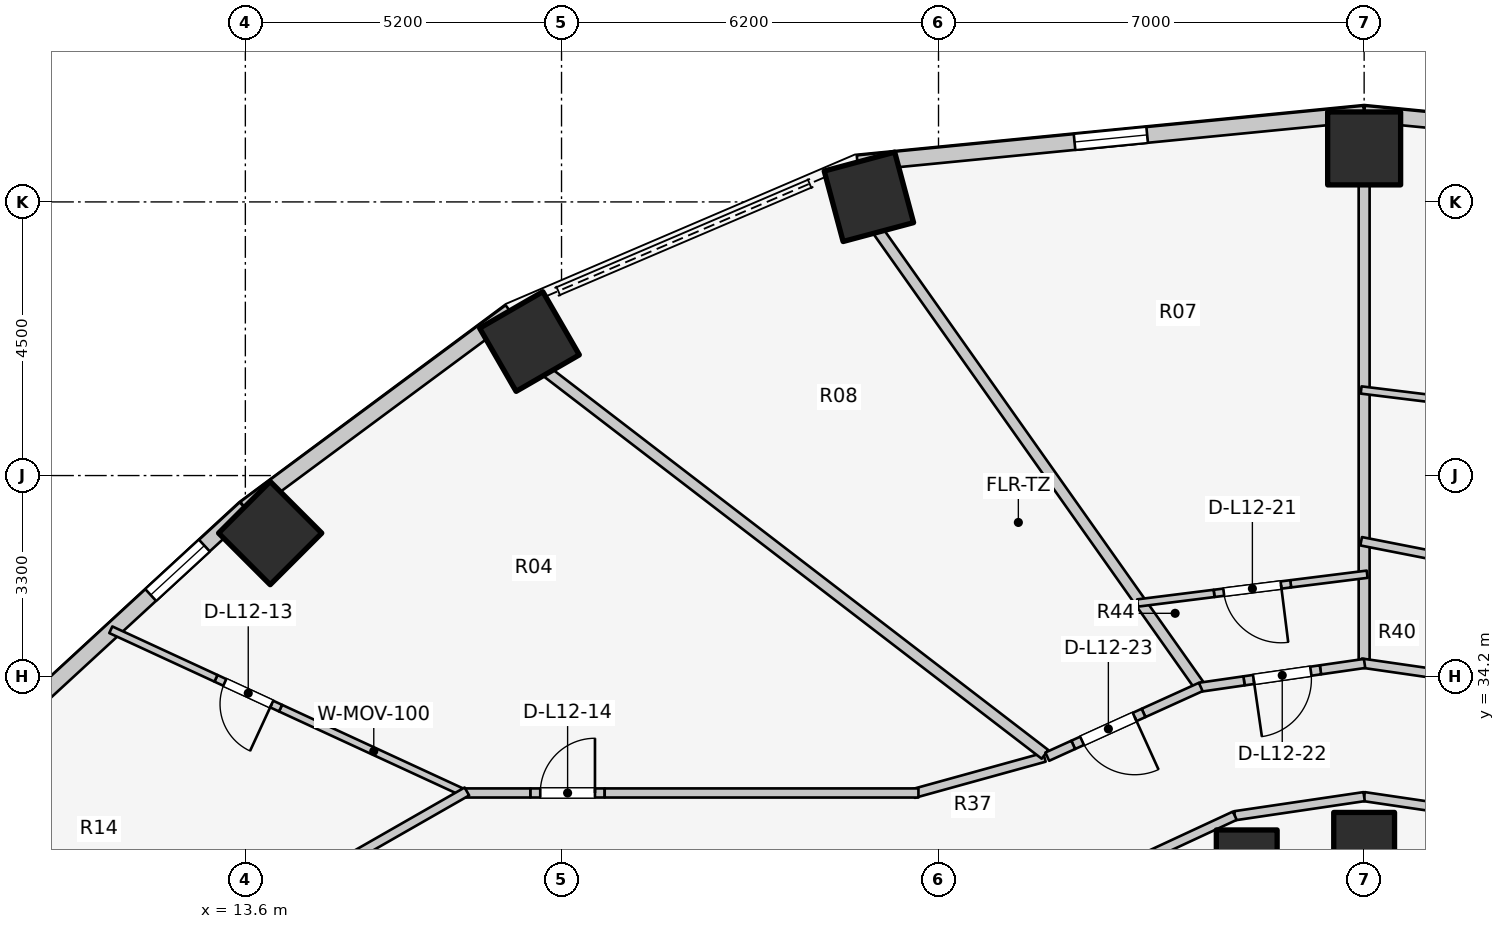
"""IFC4 building model, lengths in metres.
Left out: names, types, materials, properties, quantities, classifications, styles, units other than length and angle.
Written with IfcOpenShell. Run it as: python <this file> out.ifc"""

import sys

from ifc_helpers import new_model, si_unit, direction, frame, frame_2d, origin, origin_2d, place, context, subcontext, project, spatial, rectangle, extrude, element, fill, save


model = new_model("IFC4")
c1 = context("Model", 3, precision=1e-05, world=origin(), true_north=direction((0.0, 1.0)))
c2 = subcontext(c1, "Body", "Model", "MODEL_VIEW")
j1 = project(units=[si_unit("LENGTHUNIT", "METRE"), si_unit("PLANEANGLEUNIT", "RADIAN")], contexts=[c1])
p1 = place(None, origin())
s1 = spatial("IfcSite", under=j1, at=p1, CompositionType="ELEMENT")
p2 = place(p1, origin())
s2 = spatial("IfcBuilding", under=s1, at=p2, CompositionType="ELEMENT")
p3 = place(p2, frame((0.0, 0.0, 43.1)))
s3 = spatial("IfcBuildingStorey", under=s2, at=p3, CompositionType="ELEMENT", Elevation=43.1)
p4 = place(p3, frame((32.0, 31.46, 0.0), z_axis=(0.0, 0.0, 1.0), x_axis=(1.0, 0.0, 0.0)))
e1 = element("IfcColumn", 1, at=p4, inside=s3, PredefinedType="COLUMN", context=c2, shape_type="SweptSolid", body=[
    extrude(rectangle(XDim=1.0, YDim=1.0, at=origin_2d()), origin(), (0.0, 0.0, 1.0), 3.1),
])
p5 = place(p3, frame((32.0, 42.88, 0.0), z_axis=(0.0, 0.0, 1.0), x_axis=(0.0, 1.0, 0.0)))
e2 = element("IfcColumn", 2, at=p5, inside=s3, PredefinedType="COLUMN", context=c2, shape_type="SweptSolid", body=[
    extrude(rectangle(XDim=1.2, YDim=1.2, at=origin_2d()), origin(), (0.0, 0.0, 1.0), 3.1),
])
p6 = place(p3, frame((30.069, 31.172, 0.0), z_axis=(0.0, 0.0, 1.0), x_axis=(1.0, 0.0, 0.0)))
e3 = element("IfcColumn", 3, at=p6, inside=s3, PredefinedType="COLUMN", context=c2, shape_type="SweptSolid", body=[
    extrude(rectangle(XDim=1.0, YDim=1.0, at=origin_2d()), origin(), (0.0, 0.0, 1.0), 3.1),
])
for number, where, z_axis, x_axis in (
    (4, (23.855, 42.084, 0.0), (0.0, 0.0, 1.0), (-0.259, 0.966, 0.0)),
    (5, (18.273, 39.704, 0.0), (0.0, 0.0, 1.0), (-0.5, 0.866, 0.0)),
    (6, (14.008, 36.554, 0.0), (0.0, 0.0, 1.0), (-0.707, 0.707, 0.0)),
):
    element("IfcColumn", number, at=place(p3, frame(where, z_axis=z_axis, x_axis=x_axis)), inside=s3, PredefinedType="COLUMN", context=c2, shape_type="SweptSolid", body=[
        extrude(rectangle(XDim=1.2, YDim=1.2, at=origin_2d()), origin(), (0.0, 0.0, 1.0), 3.1),
    ])
p7 = place(p3, frame((40.332, 42.636, 0.0), z_axis=(0.0, 0.0, 1.0), x_axis=(-0.995247718352, 0.097375454379, 0.0)))
e7 = element("IfcWall", 7, at=p7, inside=s3, PredefinedType="STANDARD", context=c2, shape_type="SweptSolid", body=[
    extrude(rectangle(XDim=8.372, YDim=0.26, at=frame_2d((4.186, 0.0))), origin(), (0.0, 0.0, 1.0), 1.22),
])
p8 = place(p7, frame((3.586, 0.0, 0.15)))
e8 = element("IfcOpeningElement", 8, at=p8, cuts=e7, PredefinedType="OPENING", context=c2, shape_type="SweptSolid", body=[
    extrude(rectangle(XDim=1.2, YDim=0.9, at=frame_2d((0.6, 0.45))), frame((0.0, 0.14, 0.0), z_axis=(0.0, -1.0, 0.0), x_axis=(1.0, 0.0, 0.0)), (0.0, 0.0, 1.0), 0.28),
])
p9 = place(p3, frame((32.0, 43.451, 0.0), z_axis=(0.0, 0.0, 1.0), x_axis=(-0.995247718352, -0.097375454379, 0.0)))
e9 = element("IfcWall", 9, at=p9, inside=s3, PredefinedType="STANDARD", context=c2, shape_type="SweptSolid", body=[
    extrude(rectangle(XDim=8.372, YDim=0.26, at=frame_2d((4.186, 0.0))), origin(), (0.0, 0.0, 1.0), 1.22),
])
p10 = place(p9, frame((3.586, 0.0, 0.15)))
e10 = element("IfcOpeningElement", 10, at=p10, cuts=e9, PredefinedType="OPENING", context=c2, shape_type="SweptSolid", body=[
    extrude(rectangle(XDim=1.2, YDim=0.9, at=frame_2d((0.6, 0.45))), frame((0.0, 0.14, 0.0), z_axis=(0.0, -1.0, 0.0), x_axis=(1.0, 0.0, 0.0)), (0.0, 0.0, 1.0), 0.28),
])
p11 = place(p3, frame((17.958, 40.197, 0.0), z_axis=(0.0, 0.0, 1.0), x_axis=(-0.803477531792, -0.595335078679, 0.0)))
e11 = element("IfcWall", 11, at=p11, inside=s3, PredefinedType="STANDARD", context=c2, shape_type="SweptSolid", body=[
    extrude(rectangle(XDim=5.43, YDim=0.26, at=frame_2d((2.715, 0.0))), origin(), (0.0, 0.0, 1.0), 1.22),
])
p12 = place(p3, frame((13.595, 36.965, 0.0), z_axis=(0.0, 0.0, 1.0), x_axis=(-0.735655109293, -0.67735630223, 0.0)))
e12 = element("IfcWall", 12, at=p12, inside=s3, PredefinedType="STANDARD", context=c2, shape_type="SweptSolid", body=[
    extrude(rectangle(XDim=5.151, YDim=0.26, at=frame_2d((2.575, 0.0))), origin(), (0.0, 0.0, 1.0), 1.22),
])
p13 = place(p12, frame((0.91, 0.0, 0.15)))
e13 = element("IfcOpeningElement", 13, at=p13, cuts=e12, PredefinedType="OPENING", context=c2, shape_type="SweptSolid", body=[
    extrude(rectangle(XDim=1.2, YDim=0.9, at=frame_2d((0.6, 0.45))), frame((0.0, 0.14, 0.0), z_axis=(0.0, -1.0, 0.0), x_axis=(1.0, 0.0, 0.0)), (0.0, 0.0, 1.0), 0.28),
])
for number, where, z_axis, x_axis in (
    (14, (34.127, 31.906, 0.0), (0.0, 0.0, 1.0), (-0.989, 0.146, 0.0)),
    (15, (32.0, 32.22, 0.0), (0.0, 0.0, 1.0), (-0.989, -0.146, 0.0)),
):
    element("IfcWall", number, at=place(p3, frame(where, z_axis=z_axis, x_axis=x_axis)), inside=s3, PredefinedType="PARTITIONING", context=c2, shape_type="SweptSolid", body=[
        extrude(rectangle(XDim=2.151, YDim=0.15, at=frame_2d((1.075, 0.0))), origin(), (0.0, 0.0, 1.0), 1.22),
    ])
p14 = place(p3, frame((29.873, 31.906, 0.0), z_axis=(0.0, 0.0, 1.0), x_axis=(-0.906943449489, -0.421252393975, 0.0)))
e16 = element("IfcWall", 16, at=p14, inside=s3, PredefinedType="PARTITIONING", context=c2, shape_type="SweptSolid", body=[
    extrude(rectangle(XDim=2.186, YDim=0.15, at=frame_2d((1.093, 0.0))), origin(), (0.0, 0.0, 1.0), 1.22),
])
p15 = place(p3, frame((17.245, 32.259, 0.0), z_axis=(0.0, 0.0, 1.0), x_axis=(-0.907887445426, 0.419214010307, 0.0)))
e17 = element("IfcWall", 17, at=p15, inside=s3, PredefinedType="MOVABLE", context=c2, shape_type="SweptSolid", body=[
    extrude(rectangle(XDim=3.378, YDim=0.12, at=frame_2d((1.689, 0.0))), origin(), (0.0, 0.0, 1.0), 1.22),
])
p16 = place(p3, frame((14.179, 33.675, 0.0), z_axis=(0.0, 0.0, 1.0), x_axis=(-0.907812768844, 0.419375698776, 0.0)))
e18 = element("IfcWall", 18, at=p16, inside=s3, PredefinedType="MOVABLE", context=c2, shape_type="SweptSolid", body=[
    extrude(rectangle(XDim=1.17, YDim=0.12, at=frame_2d((0.585, 0.0))), origin(), (0.0, 0.0, 1.0), 2.11),
])
p17 = place(p16, frame((0.16, 0.0, 0.0)))
e19 = element("IfcOpeningElement", 19, at=p17, cuts=e18, PredefinedType="OPENING", context=c2, shape_type="SweptSolid", body=[
    extrude(rectangle(XDim=0.85, YDim=2.05, at=frame_2d((0.425, 1.025))), frame((0.0, 0.07, 0.0), z_axis=(0.0, -1.0, 0.0), x_axis=(1.0, 0.0, 0.0)), (0.0, 0.0, 1.0), 0.14),
])
p18 = place(p3, frame((13.116, 34.166, 0.0), z_axis=(0.0, 0.0, 1.0), x_axis=(-0.907914359179, 0.419155718554, 0.0)))
e20 = element("IfcWall", 20, at=p18, inside=s3, PredefinedType="MOVABLE", context=c2, shape_type="SweptSolid", body=[
    extrude(rectangle(XDim=1.905, YDim=0.12, at=frame_2d((0.952, 0.0))), origin(), (0.0, 0.0, 1.0), 2.575),
])
p19 = place(p3, frame((26.742, 32.867, 0.0), z_axis=(0.0, 0.0, 1.0), x_axis=(-0.963833843713, -0.266503886865, 0.0)))
e21 = element("IfcWall", 21, at=p19, inside=s3, PredefinedType="PARTITIONING", context=c2, shape_type="SweptSolid", body=[
    extrude(rectangle(XDim=2.232, YDim=0.15, at=frame_2d((1.116, 0.0))), origin(), (0.0, 0.0, 1.0), 1.22),
])
p20 = place(p3, frame((17.15, 32.28, 0.0), z_axis=(0.0, 0.0, 1.0), x_axis=(1.0, 0.0, 0.0)))
e22 = element("IfcWall", 22, at=p20, inside=s3, PredefinedType="PARTITIONING", context=c2, shape_type="SweptSolid", body=[
    extrude(rectangle(XDim=1.14, YDim=0.15, at=frame_2d((0.57, 0.0))), origin(), (0.0, 0.0, 1.0), 2.575),
])
p21 = place(p3, frame((18.29, 32.28, 0.0), z_axis=(0.0, 0.0, 1.0), x_axis=(1.0, 0.0, 0.0)))
e23 = element("IfcWall", 23, at=p21, inside=s3, PredefinedType="PARTITIONING", context=c2, shape_type="SweptSolid", body=[
    extrude(rectangle(XDim=1.22, YDim=0.15, at=frame_2d((0.61, 0.0))), origin(), (0.0, 0.0, 1.0), 2.575),
])
p22 = place(p21, frame((0.16, 0.0, 0.0)))
e24 = element("IfcOpeningElement", 24, at=p22, cuts=e23, PredefinedType="OPENING", context=c2, shape_type="SweptSolid", body=[
    extrude(rectangle(XDim=0.9, YDim=2.1, at=frame_2d((0.45, 1.05))), frame((0.0, 0.085, 0.0), z_axis=(0.0, -1.0, 0.0), x_axis=(1.0, 0.0, 0.0)), (0.0, 0.0, 1.0), 0.17),
])
p23 = place(p3, frame((19.51, 32.28, 0.0), z_axis=(0.0, 0.0, 1.0), x_axis=(1.0, 0.0, 0.0)))
e25 = element("IfcWall", 25, at=p23, inside=s3, PredefinedType="PARTITIONING", context=c2, shape_type="SweptSolid", body=[
    extrude(rectangle(XDim=5.16, YDim=0.15, at=frame_2d((2.58, 0.0))), origin(), (0.0, 0.0, 1.0), 1.22),
])
p24 = place(p3, frame((17.243, 32.305, 0.0), z_axis=(0.0, 0.0, 1.0), x_axis=(-0.867991349648, -0.496579315857, 0.0)))
e26 = element("IfcWall", 26, at=p24, inside=s3, PredefinedType="PARTITIONING", context=c2, shape_type="SweptSolid", body=[
    extrude(rectangle(XDim=2.567, YDim=0.15, at=frame_2d((1.283, 0.0))), origin(), (0.0, 0.0, 1.0), 1.22),
])
p25 = place(p3, frame((32.0, 34.465, 0.0), z_axis=(0.0, 0.0, 1.0), x_axis=(0.0, 1.0, 0.0)))
e27 = element("IfcWall", 27, at=p25, inside=s3, PredefinedType="PARTITIONING", context=c2, shape_type="SweptSolid", body=[
    extrude(rectangle(XDim=7.835, YDim=0.18, at=frame_2d((3.917, 0.0))), origin(), (0.0, 0.0, 1.0), 1.22),
])
p26 = place(p3, frame((29.274, 34.066, 0.0), z_axis=(0.0, 0.0, 1.0), x_axis=(-0.577036915124, 0.816718065543, 0.0)))
e28 = element("IfcWall", 28, at=p26, inside=s3, PredefinedType="PARTITIONING", context=c2, shape_type="SweptSolid", body=[
    extrude(rectangle(XDim=9.131, YDim=0.18, at=frame_2d((4.565, 0.0))), origin(), (0.0, 0.0, 1.0), 1.22),
])
p27 = place(p3, frame((26.751, 32.915, 0.0), z_axis=(0.0, 0.0, 1.0), x_axis=(-0.793181014702, 0.608985942298, 0.0)))
e29 = element("IfcWall", 29, at=p27, inside=s3, PredefinedType="PARTITIONING", context=c2, shape_type="SweptSolid", body=[
    extrude(rectangle(XDim=10.324, YDim=0.18, at=frame_2d((5.162, 0.0))), origin(), (0.0, 0.0, 1.0), 1.22),
])
p28 = place(p3, frame((33.687, 38.694, 0.0), z_axis=(0.0, 0.0, 1.0), x_axis=(-0.992518556774, 0.122093875605, 0.0)))
e30 = element("IfcWall", 30, at=p28, inside=s3, PredefinedType="MOVABLE", context=c2, shape_type="SweptSolid", body=[
    extrude(rectangle(XDim=1.75, YDim=0.12, at=frame_2d((0.875, 0.0))), origin(), (0.0, 0.0, 1.0), 1.22),
])
p29 = place(p3, frame((34.744, 34.014, 0.0), z_axis=(0.0, 0.0, 1.0), x_axis=(-0.989761784218, 0.142729150844, 0.0)))
e31 = element("IfcWall", 31, at=p29, inside=s3, PredefinedType="PARTITIONING", context=c2, shape_type="SweptSolid", body=[
    extrude(rectangle(XDim=2.822, YDim=0.15, at=frame_2d((1.411, 0.0))), origin(), (0.0, 0.0, 1.0), 1.22),
])
p30 = place(p3, frame((33.326, 36.15, 0.0), z_axis=(0.0, 0.0, 1.0), x_axis=(-0.981284705137, 0.192562528712, 0.0)))
e32 = element("IfcWall", 32, at=p30, inside=s3, PredefinedType="PLUMBINGWALL", context=c2, shape_type="SweptSolid", body=[
    extrude(rectangle(XDim=1.401, YDim=0.14, at=frame_2d((0.7, 0.0))), origin(), (0.0, 0.0, 1.0), 1.22),
])
p31 = place(p3, frame((32.05, 35.877, 0.0), z_axis=(0.0, 0.0, 1.0), x_axis=(-0.992251181548, -0.124248109512, 0.0)))
e33 = element("IfcWall", 33, at=p31, inside=s3, PredefinedType="MOVABLE", context=c2, shape_type="SweptSolid", body=[
    extrude(rectangle(XDim=1.267, YDim=0.12, at=frame_2d((0.634, 0.0))), origin(), (0.0, 0.0, 1.0), 1.22),
])
p32 = place(p3, frame((30.792, 35.72, 0.0), z_axis=(0.0, 0.0, 1.0), x_axis=(-0.992257157897, -0.124200372796, 0.0)))
e34 = element("IfcWall", 34, at=p32, inside=s3, PredefinedType="MOVABLE", context=c2, shape_type="SweptSolid", body=[
    extrude(rectangle(XDim=1.27, YDim=0.12, at=frame_2d((0.635, 0.0))), origin(), (0.0, 0.0, 1.0), 2.575),
])
p33 = place(p32, frame((0.16, 0.0, 0.0)))
e35 = element("IfcOpeningElement", 35, at=p33, cuts=e34, PredefinedType="OPENING", context=c2, shape_type="SweptSolid", body=[
    extrude(rectangle(XDim=0.95, YDim=2.1, at=frame_2d((0.475, 1.05))), frame((0.0, 0.07, 0.0), z_axis=(0.0, -1.0, 0.0), x_axis=(1.0, 0.0, 0.0)), (0.0, 0.0, 1.0), 0.14),
])
p34 = place(p3, frame((29.532, 35.562, 0.0), z_axis=(0.0, 0.0, 1.0), x_axis=(-0.992227415201, -0.124437761642, 0.0)))
e36 = element("IfcWall", 36, at=p34, inside=s3, PredefinedType="MOVABLE", context=c2, shape_type="SweptSolid", body=[
    extrude(rectangle(XDim=1.267, YDim=0.12, at=frame_2d((0.634, 0.0))), origin(), (0.0, 0.0, 1.0), 2.575),
])
p35 = place(p3, frame((32.007, 34.41, 0.0), z_axis=(0.0, 0.0, 1.0), x_axis=(-0.989795766197, -0.142493302365, 0.0)))
e37 = element("IfcWall", 37, at=p35, inside=s3, PredefinedType="PARTITIONING", context=c2, shape_type="SweptSolid", body=[
    extrude(rectangle(XDim=0.733, YDim=0.15, at=frame_2d((0.367, 0.0))), origin(), (0.0, 0.0, 1.0), 1.22),
])
p36 = place(p3, frame((31.281, 34.305, 0.0), z_axis=(0.0, 0.0, 1.0), x_axis=(-0.989721405299, -0.14300888047, 0.0)))
e38 = element("IfcWall", 38, at=p36, inside=s3, PredefinedType="PARTITIONING", context=c2, shape_type="SweptSolid", body=[
    extrude(rectangle(XDim=1.27, YDim=0.15, at=frame_2d((0.635, 0.0))), origin(), (0.0, 0.0, 1.0), 2.575),
])
p37 = place(p36, frame((0.16, 0.0, 0.0)))
e39 = element("IfcOpeningElement", 39, at=p37, cuts=e38, PredefinedType="OPENING", context=c2, shape_type="SweptSolid", body=[
    extrude(rectangle(XDim=0.95, YDim=2.1, at=frame_2d((0.475, 1.05))), frame((0.0, 0.085, 0.0), z_axis=(0.0, -1.0, 0.0), x_axis=(1.0, 0.0, 0.0)), (0.0, 0.0, 1.0), 0.17),
])
p38 = place(p3, frame((30.024, 34.124, 0.0), z_axis=(0.0, 0.0, 1.0), x_axis=(-0.98974875873, -0.142819447526, 0.0)))
e40 = element("IfcWall", 40, at=p38, inside=s3, PredefinedType="PARTITIONING", context=c2, shape_type="SweptSolid", body=[
    extrude(rectangle(XDim=0.733, YDim=0.15, at=frame_2d((0.367, 0.0))), origin(), (0.0, 0.0, 1.0), 2.575),
])
p39 = place(p3, frame((29.313, 34.023, 0.0), z_axis=(0.0, 0.0, 1.0), x_axis=(-0.910657491524, -0.413162114831, 0.0)))
e41 = element("IfcWall", 41, at=p39, inside=s3, PredefinedType="PARTITIONING", context=c2, shape_type="SweptSolid", body=[
    extrude(rectangle(XDim=1.033, YDim=0.15, at=frame_2d((0.517, 0.0))), origin(), (0.0, 0.0, 1.0), 1.22),
])
p40 = place(p3, frame((28.372, 33.596, 0.0), z_axis=(0.0, 0.0, 1.0), x_axis=(-0.910491529429, -0.413527719553, 0.0)))
e42 = element("IfcWall", 42, at=p40, inside=s3, PredefinedType="PARTITIONING", context=c2, shape_type="SweptSolid", body=[
    extrude(rectangle(XDim=1.27, YDim=0.15, at=frame_2d((0.635, 0.0))), origin(), (0.0, 0.0, 1.0), 2.16),
])
p41 = place(p40, frame((0.16, 0.0, 0.0)))
e43 = element("IfcOpeningElement", 43, at=p41, cuts=e42, PredefinedType="OPENING", context=c2, shape_type="SweptSolid", body=[
    extrude(rectangle(XDim=0.95, YDim=2.1, at=frame_2d((0.475, 1.05))), frame((0.0, 0.085, 0.0), z_axis=(0.0, -1.0, 0.0), x_axis=(1.0, 0.0, 0.0)), (0.0, 0.0, 1.0), 0.17),
])
p42 = place(p3, frame((27.215, 33.071, 0.0), z_axis=(0.0, 0.0, 1.0), x_axis=(-0.910580557663, -0.413331644091, 0.0)))
e44 = element("IfcWall", 44, at=p42, inside=s3, PredefinedType="PARTITIONING", context=c2, shape_type="SweptSolid", body=[
    extrude(rectangle(XDim=0.469, YDim=0.15, at=frame_2d((0.234, 0.0))), origin(), (0.0, 0.0, 1.0), 2.575),
])
p43 = place(p10, origin())
e45 = element("IfcWindow", 45, at=p43, inside=s3, PartitioningType="SINGLE_PANEL", PredefinedType="WINDOW", context=c2, shape_type="SweptSolid", body=[
    extrude(rectangle(XDim=1.2, YDim=0.9, at=frame_2d((0.6, 0.45))), frame((0.0, 0.03, 0.0), z_axis=(0.0, -1.0, 0.0), x_axis=(1.0, 0.0, 0.0)), (0.0, 0.0, 1.0), 0.06),
])
fill(e10, e45)
p44 = place(p13, origin())
e46 = element("IfcWindow", 46, at=p44, inside=s3, PartitioningType="SINGLE_PANEL", PredefinedType="WINDOW", context=c2, shape_type="SweptSolid", body=[
    extrude(rectangle(XDim=1.2, YDim=0.9, at=frame_2d((0.6, 0.45))), frame((0.0, 0.03, 0.0), z_axis=(0.0, -1.0, 0.0), x_axis=(1.0, 0.0, 0.0)), (0.0, 0.0, 1.0), 0.06),
])
fill(e13, e46)
p45 = place(p17, origin())
e47 = element("IfcDoor", 47, at=p45, inside=s3, OperationType="SINGLE_SWING_LEFT", PredefinedType="DOOR", context=c2, shape_type="SweptSolid", body=[
    extrude(rectangle(XDim=0.85, YDim=2.05, at=frame_2d((0.425, 1.025))), frame((0.0, 0.025, 0.0), z_axis=(0.0, -1.0, 0.0), x_axis=(1.0, 0.0, 0.0)), (0.0, 0.0, 1.0), 0.05),
])
fill(e19, e47)
p46 = place(p22, origin())
e48 = element("IfcDoor", 48, at=p46, inside=s3, OperationType="SINGLE_SWING_RIGHT", PredefinedType="DOOR", context=c2, shape_type="SweptSolid", body=[
    extrude(rectangle(XDim=0.9, YDim=2.1, at=frame_2d((0.45, 1.05))), frame((0.0, 0.025, 0.0), z_axis=(0.0, -1.0, 0.0), x_axis=(1.0, 0.0, 0.0)), (0.0, 0.0, 1.0), 0.05),
])
fill(e24, e48)
p47 = place(p33, origin())
e49 = element("IfcDoor", 49, at=p47, inside=s3, OperationType="SINGLE_SWING_LEFT", PredefinedType="DOOR", context=c2, shape_type="SweptSolid", body=[
    extrude(rectangle(XDim=0.95, YDim=2.1, at=frame_2d((0.475, 1.05))), frame((0.0, 0.025, 0.0), z_axis=(0.0, -1.0, 0.0), x_axis=(1.0, 0.0, 0.0)), (0.0, 0.0, 1.0), 0.05),
])
fill(e35, e49)
p48 = place(p37, origin())
e50 = element("IfcDoor", 50, at=p48, inside=s3, OperationType="SINGLE_SWING_RIGHT", PredefinedType="DOOR", context=c2, shape_type="SweptSolid", body=[
    extrude(rectangle(XDim=0.95, YDim=2.1, at=frame_2d((0.475, 1.05))), frame((0.0, 0.025, 0.0), z_axis=(0.0, -1.0, 0.0), x_axis=(1.0, 0.0, 0.0)), (0.0, 0.0, 1.0), 0.05),
])
fill(e39, e50)
p49 = place(p41, origin())
e51 = element("IfcDoor", 51, at=p49, inside=s3, OperationType="SINGLE_SWING_LEFT", PredefinedType="DOOR", context=c2, shape_type="SweptSolid", body=[
    extrude(rectangle(XDim=0.95, YDim=2.1, at=frame_2d((0.475, 1.05))), frame((0.0, 0.025, 0.0), z_axis=(0.0, -1.0, 0.0), x_axis=(1.0, 0.0, 0.0)), (0.0, 0.0, 1.0), 0.05),
])
fill(e43, e51)
save(model, sys.argv[1])
